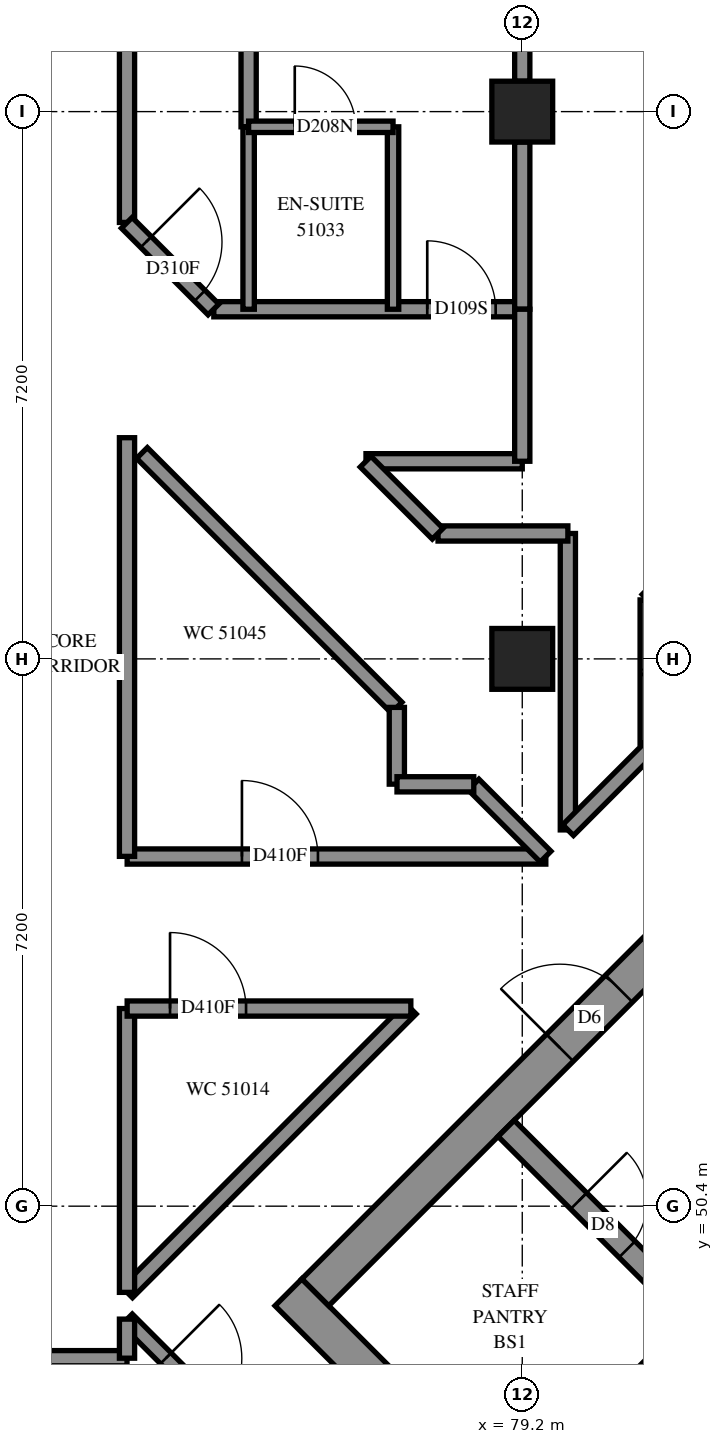
"""IFC4 building model, lengths in metres.
Left out: names, types, materials, properties, quantities, classifications, styles, units other than length and angle.
Written with IfcOpenShell. Run it as: python <this file> out.ifc"""

import sys

from ifc_helpers import new_model, si_unit, direction, frame, frame_2d, origin, origin_2d, place, context, subcontext, project, spatial, rectangle, extrude, element, fill, save


model = new_model("IFC4")
c1 = context("Model", 3, precision=1e-05, world=origin(), true_north=direction((0.0, 1.0)))
c2 = subcontext(c1, "Body", "Model", "MODEL_VIEW")
j1 = project(units=[si_unit("LENGTHUNIT", "METRE"), si_unit("PLANEANGLEUNIT", "RADIAN")], contexts=[c1])
p1 = place(None, origin())
s1 = spatial("IfcSite", under=j1, at=p1, CompositionType="ELEMENT")
p2 = place(p1, origin())
s2 = spatial("IfcBuilding", under=s1, at=p2, CompositionType="ELEMENT")
p3 = place(p2, frame((0.0, 0.0, 189.6)))
s3 = spatial("IfcBuildingStorey", under=s2, at=p3, CompositionType="ELEMENT", Elevation=189.6)
for number, where, z_axis, x_axis in (
    (1, (79.2, 57.6, 0.0), (0.0, 0.0, 1.0), (1.0, 0.0, 0.0)),
    (2, (79.2, 64.8, 0.0), (0.0, 0.0, 1.0), (1.0, 0.0, 0.0)),
):
    element("IfcColumn", number, at=place(p3, frame(where, z_axis=z_axis, x_axis=x_axis)), inside=s3, PredefinedType="COLUMN", context=c2, shape_type="SweptSolid", body=[
        extrude(rectangle(XDim=0.8, YDim=0.8, at=origin_2d()), origin(), (0.0, 0.0, 1.0), 3.1),
    ])
p4 = place(p3, frame((76.124, 49.267, -0.3), z_axis=(0.0, 0.0, 1.0), x_axis=(0.7071067812, -0.7071067812, 0.0)))
e3 = element("IfcWall", 3, at=p4, inside=s3, PredefinedType="SHEAR", context=c2, shape_type="SweptSolid", body=[
    extrude(rectangle(XDim=15.4, YDim=0.5, at=frame_2d((7.7, 0.0))), origin(), (0.0, 0.0, 1.0), 2.7),
])
p5 = place(p3, frame((76.478, 49.267, -0.3), z_axis=(0.0, 0.0, 1.0), x_axis=(0.7071067812, 0.7071067812, 0.0)))
e4 = element("IfcWall", 4, at=p5, inside=s3, PredefinedType="SHEAR", context=c2, shape_type="SweptSolid", body=[
    extrude(rectangle(XDim=14.4, YDim=0.5, at=frame_2d((7.2, 0.0))), origin(), (0.0, 0.0, 1.0), 2.7),
])
p6 = place(p5, frame((4.55, 0.0, 0.3)))
e5 = element("IfcOpeningElement", 5, at=p6, cuts=e4, PredefinedType="OPENING", context=c2, shape_type="SweptSolid", body=[
    extrude(rectangle(XDim=1.1, YDim=2.1, at=frame_2d((0.55, 1.05))), frame((0.0, 0.26, 0.0), z_axis=(0.0, -1.0, 0.0), x_axis=(1.0, 0.0, 0.0)), (0.0, 0.0, 1.0), 0.52),
])
p7 = place(p5, frame((11.35, 0.0, 0.3)))
e6 = element("IfcOpeningElement", 6, at=p7, cuts=e4, PredefinedType="OPENING", context=c2, shape_type="SweptSolid", body=[
    extrude(rectangle(XDim=1.1, YDim=2.1, at=frame_2d((0.55, 1.05))), frame((0.0, 0.26, 0.0), z_axis=(0.0, -1.0, 0.0), x_axis=(1.0, 0.0, 0.0)), (0.0, 0.0, 1.0), 0.52),
])
p8 = place(p3, frame((79.2, 46.544, 0.0), z_axis=(0.0, 0.0, 1.0), x_axis=(0.7071219326, 0.7070916295, 0.0)))
e7 = element("IfcWall", 7, at=p8, inside=s3, PredefinedType="SOLIDWALL", context=c2, shape_type="SweptSolid", body=[
    extrude(rectangle(XDim=3.3, YDim=0.3, at=frame_2d((1.65, 0.0))), origin(), (0.0, 0.0, 1.0), 3.1),
])
p9 = place(p3, frame((78.988, 51.423, 0.0), z_axis=(0.0, 0.0, 1.0), x_axis=(0.7071067812, -0.7071067812, 0.0)))
e8 = element("IfcWall", 8, at=p9, inside=s3, PredefinedType="SOLIDWALL", context=c2, shape_type="SweptSolid", body=[
    extrude(rectangle(XDim=14.4, YDim=0.3, at=frame_2d((7.2, 0.0))), origin(), (0.0, 0.0, 1.0), 3.1),
])
p10 = place(p9, frame((1.35, 0.0, 0.0)))
e9 = element("IfcOpeningElement", 9, at=p10, cuts=e8, PredefinedType="OPENING", context=c2, shape_type="SweptSolid", body=[
    extrude(rectangle(XDim=0.9, YDim=2.1, at=frame_2d((0.45, 1.05))), frame((0.0, 0.16, 0.0), z_axis=(0.0, -1.0, 0.0), x_axis=(1.0, 0.0, 0.0)), (0.0, 0.0, 1.0), 0.32),
])
p11 = place(p9, frame((4.95, 0.0, 0.0)))
e10 = element("IfcOpeningElement", 10, at=p11, cuts=e8, PredefinedType="OPENING", context=c2, shape_type="SweptSolid", body=[
    extrude(rectangle(XDim=0.9, YDim=2.1, at=frame_2d((0.45, 1.05))), frame((0.0, 0.16, 0.0), z_axis=(0.0, -1.0, 0.0), x_axis=(1.0, 0.0, 0.0)), (0.0, 0.0, 1.0), 0.32),
])
p12 = place(p9, frame((8.55, 0.0, 0.0)))
e11 = element("IfcOpeningElement", 11, at=p12, cuts=e8, PredefinedType="OPENING", context=c2, shape_type="SweptSolid", body=[
    extrude(rectangle(XDim=0.9, YDim=2.1, at=frame_2d((0.45, 1.05))), frame((0.0, 0.16, 0.0), z_axis=(0.0, -1.0, 0.0), x_axis=(1.0, 0.0, 0.0)), (0.0, 0.0, 1.0), 0.32),
])
p13 = place(p9, frame((12.05, 0.0, 0.0)))
e12 = element("IfcOpeningElement", 12, at=p13, cuts=e8, PredefinedType="OPENING", context=c2, shape_type="SweptSolid", body=[
    extrude(rectangle(XDim=1.1, YDim=2.1, at=frame_2d((0.55, 1.05))), frame((0.0, 0.16, 0.0), z_axis=(0.0, -1.0, 0.0), x_axis=(1.0, 0.0, 0.0)), (0.0, 0.0, 1.0), 0.32),
])
p14 = place(p3, frame((55.6, 48.4, 0.0), z_axis=(0.0, 0.0, 1.0), x_axis=(1.0, 0.0, 0.0)))
e13 = element("IfcWall", 13, at=p14, inside=s3, PredefinedType="PARTITIONING", context=c2, shape_type="SweptSolid", body=[
    extrude(rectangle(XDim=18.4, YDim=0.2, at=frame_2d((9.2, 0.0))), origin(), (0.0, 0.0, 1.0), 3.1),
])
p15 = place(p14, frame((5.862, 0.0, 0.0)))
e14 = element("IfcOpeningElement", 14, at=p15, cuts=e13, PredefinedType="OPENING", context=c2, shape_type="SweptSolid", body=[
    extrude(rectangle(XDim=1.0, YDim=2.1, at=frame_2d((0.5, 1.05))), frame((0.0, 0.11, 0.0), z_axis=(0.0, -1.0, 0.0), x_axis=(1.0, 0.0, 0.0)), (0.0, 0.0, 1.0), 0.22),
])
p16 = place(p14, frame((11.5, 0.0, 0.0)))
e15 = element("IfcOpeningElement", 15, at=p16, cuts=e13, PredefinedType="OPENING", context=c2, shape_type="SweptSolid", body=[
    extrude(rectangle(XDim=0.9, YDim=2.1, at=frame_2d((0.45, 1.05))), frame((0.0, 0.11, 0.0), z_axis=(0.0, -1.0, 0.0), x_axis=(1.0, 0.0, 0.0)), (0.0, 0.0, 1.0), 0.22),
])
p17 = place(p14, frame((13.2, 0.0, 0.0)))
e16 = element("IfcOpeningElement", 16, at=p17, cuts=e13, PredefinedType="OPENING", context=c2, shape_type="SweptSolid", body=[
    extrude(rectangle(XDim=0.9, YDim=2.1, at=frame_2d((0.45, 1.05))), frame((0.0, 0.11, 0.0), z_axis=(0.0, -1.0, 0.0), x_axis=(1.0, 0.0, 0.0)), (0.0, 0.0, 1.0), 0.22),
])
p18 = place(p3, frame((80.849, 58.377, 0.0), z_axis=(0.0, 0.0, 1.0), x_axis=(0.7071121477, 0.7071014147, 0.0)))
e17 = element("IfcWall", 17, at=p18, inside=s3, PredefinedType="PARTITIONING", context=c2, shape_type="SweptSolid", body=[
    extrude(rectangle(XDim=9.317, YDim=0.2, at=frame_2d((4.659, 0.0))), origin(), (0.0, 0.0, 1.0), 3.1),
])
p19 = place(p3, frame((75.6, 64.6, 0.0), z_axis=(0.0, 0.0, 1.0), x_axis=(0.0, 1.0, 0.0)))
e18 = element("IfcWall", 18, at=p19, inside=s3, PredefinedType="PARTITIONING", context=c2, shape_type="SweptSolid", body=[
    extrude(rectangle(XDim=8.153, YDim=0.2, at=frame_2d((4.076, 0.0))), origin(), (0.0, 0.0, 1.0), 3.1),
])
p20 = place(p3, frame((79.2, 65.2, 0.0), z_axis=(0.0, 0.0, 1.0), x_axis=(0.0, 1.0, 0.0)))
e19 = element("IfcWall", 19, at=p20, inside=s3, PredefinedType="PARTITIONING", context=c2, shape_type="SweptSolid", body=[
    extrude(rectangle(XDim=6.4, YDim=0.2, at=frame_2d((3.2, 0.0))), origin(), (0.0, 0.0, 1.0), 3.1),
])
p21 = place(p3, frame((73.999, 48.911, 0.0), z_axis=(0.0, 0.0, 1.0), x_axis=(0.7071067812, -0.7071067812, 0.0)))
e20 = element("IfcWall", 20, at=p21, inside=s3, PredefinedType="PARTITIONING", context=c2, shape_type="SweptSolid", body=[
    extrude(rectangle(XDim=5.745, YDim=0.2, at=frame_2d((2.872, 0.0))), origin(), (0.0, 0.0, 1.0), 3.1),
])
p22 = place(p21, frame((0.724, 0.0, 0.0)))
e21 = element("IfcOpeningElement", 21, at=p22, cuts=e20, PredefinedType="OPENING", context=c2, shape_type="SweptSolid", body=[
    extrude(rectangle(XDim=1.0, YDim=2.1, at=frame_2d((0.5, 1.05))), frame((0.0, 0.11, 0.0), z_axis=(0.0, -1.0, 0.0), x_axis=(1.0, 0.0, 0.0)), (0.0, 0.0, 1.0), 0.22),
])
p23 = place(p3, frame((74.002, 55.0, 0.0), z_axis=(0.0, 0.0, 1.0), x_axis=(1.0, 0.0, 0.0)))
e22 = element("IfcWall", 22, at=p23, inside=s3, PredefinedType="PARTITIONING", context=c2, shape_type="SweptSolid", body=[
    extrude(rectangle(XDim=5.508, YDim=0.2, at=frame_2d((2.754, 0.0))), origin(), (0.0, 0.0, 1.0), 3.1),
])
p24 = place(p23, frame((1.51, 0.0, 0.0)))
e23 = element("IfcOpeningElement", 23, at=p24, cuts=e22, PredefinedType="OPENING", context=c2, shape_type="SweptSolid", body=[
    extrude(rectangle(XDim=1.0, YDim=2.1, at=frame_2d((0.5, 1.05))), frame((0.0, 0.11, 0.0), z_axis=(0.0, -1.0, 0.0), x_axis=(1.0, 0.0, 0.0)), (0.0, 0.0, 1.0), 0.22),
])
p25 = place(p3, frame((74.0, 55.002, 0.0), z_axis=(0.0, 0.0, 1.0), x_axis=(0.0, 1.0, 0.0)))
e24 = element("IfcWall", 24, at=p25, inside=s3, PredefinedType="PARTITIONING", context=c2, shape_type="SweptSolid", body=[
    extrude(rectangle(XDim=5.508, YDim=0.2, at=frame_2d((2.754, 0.0))), origin(), (0.0, 0.0, 1.0), 3.1),
])
p26 = place(p3, frame((74.001, 49.267, 0.0), z_axis=(0.0, 0.0, 1.0), x_axis=(0.7071067812, 0.7071067812, 0.0)))
e25 = element("IfcWall", 25, at=p26, inside=s3, PredefinedType="PARTITIONING", context=c2, shape_type="SweptSolid", body=[
    extrude(rectangle(XDim=5.278, YDim=0.2, at=frame_2d((2.639, 0.0))), origin(), (0.0, 0.0, 1.0), 3.1),
])
p27 = place(p3, frame((74.197, 60.309, 0.0), z_axis=(0.0, 0.0, 1.0), x_axis=(0.7071067812, -0.7071067812, 0.0)))
e26 = element("IfcWall", 26, at=p27, inside=s3, PredefinedType="PARTITIONING", context=c2, shape_type="SweptSolid", body=[
    extrude(rectangle(XDim=4.738, YDim=0.2, at=frame_2d((2.369, 0.0))), origin(), (0.0, 0.0, 1.0), 3.1),
])
p28 = place(p3, frame((75.142, 62.2, 0.0), z_axis=(0.0, 0.0, 1.0), x_axis=(1.0, 0.0, 0.0)))
e27 = element("IfcWall", 27, at=p28, inside=s3, PredefinedType="PARTITIONING", context=c2, shape_type="SweptSolid", body=[
    extrude(rectangle(XDim=4.058, YDim=0.2, at=frame_2d((2.029, 0.0))), origin(), (0.0, 0.0, 1.0), 3.1),
])
p29 = place(p28, frame((2.808, 0.0, 0.0)))
e28 = element("IfcOpeningElement", 28, at=p29, cuts=e27, PredefinedType="OPENING", context=c2, shape_type="SweptSolid", body=[
    extrude(rectangle(XDim=0.9, YDim=2.1, at=frame_2d((0.45, 1.05))), frame((0.0, 0.11, 0.0), z_axis=(0.0, -1.0, 0.0), x_axis=(1.0, 0.0, 0.0)), (0.0, 0.0, 1.0), 0.22),
])
p30 = place(p3, frame((79.8, 55.35, 0.0), z_axis=(0.0, 0.0, 1.0), x_axis=(0.0, 1.0, 0.0)))
e29 = element("IfcWall", 29, at=p30, inside=s3, PredefinedType="PARTITIONING", context=c2, shape_type="SweptSolid", body=[
    extrude(rectangle(XDim=3.9, YDim=0.2, at=frame_2d((1.95, 0.0))), origin(), (0.0, 0.0, 1.0), 3.1),
])
p31 = place(p3, frame((74.0, 49.266, 0.0), z_axis=(0.0, 0.0, 1.0), x_axis=(0.0, 1.0, 0.0)))
e30 = element("IfcWall", 30, at=p31, inside=s3, PredefinedType="PARTITIONING", context=c2, shape_type="SweptSolid", body=[
    extrude(rectangle(XDim=3.734, YDim=0.2, at=frame_2d((1.867, 0.0))), origin(), (0.0, 0.0, 1.0), 3.1),
])
p32 = place(p3, frame((74.002, 53.0, 0.0), z_axis=(0.0, 0.0, 1.0), x_axis=(1.0, 0.0, 0.0)))
e31 = element("IfcWall", 31, at=p32, inside=s3, PredefinedType="PARTITIONING", context=c2, shape_type="SweptSolid", body=[
    extrude(rectangle(XDim=3.732, YDim=0.2, at=frame_2d((1.866, 0.0))), origin(), (0.0, 0.0, 1.0), 3.1),
])
p33 = place(p32, frame((0.564, 0.0, 0.0)))
e32 = element("IfcOpeningElement", 32, at=p33, cuts=e31, PredefinedType="OPENING", context=c2, shape_type="SweptSolid", body=[
    extrude(rectangle(XDim=1.0, YDim=2.1, at=frame_2d((0.5, 1.05))), frame((0.0, 0.11, 0.0), z_axis=(0.0, -1.0, 0.0), x_axis=(1.0, 0.0, 0.0)), (0.0, 0.0, 1.0), 0.22),
])
p34 = place(p3, frame((74.0, 63.342, 0.0), z_axis=(0.0, 0.0, 1.0), x_axis=(0.0, 1.0, 0.0)))
e33 = element("IfcWall", 33, at=p34, inside=s3, PredefinedType="PARTITIONING", context=c2, shape_type="SweptSolid", body=[
    extrude(rectangle(XDim=3.458, YDim=0.2, at=frame_2d((1.729, 0.0))), origin(), (0.0, 0.0, 1.0), 3.1),
])
for number, where, z_axis, x_axis in (
    (34, (75.6, 62.2, 0.0), (0.0, 0.0, 1.0), (0.0, 1.0, 0.0)),
    (35, (77.5, 62.2, 0.0), (0.0, 0.0, 1.0), (0.0, 1.0, 0.0)),
):
    element("IfcWall", number, at=place(p3, frame(where, z_axis=z_axis, x_axis=x_axis)), inside=s3, PredefinedType="PARTITIONING", context=c2, shape_type="SweptSolid", body=[
        extrude(rectangle(XDim=2.4, YDim=0.15, at=frame_2d((1.2, 0.0))), origin(), (0.0, 0.0, 1.0), 3.1),
    ])
p35 = place(p3, frame((79.2, 62.2, 0.0), z_axis=(0.0, 0.0, 1.0), x_axis=(0.0, 1.0, 0.0)))
e36 = element("IfcWall", 36, at=p35, inside=s3, PredefinedType="PARTITIONING", context=c2, shape_type="SweptSolid", body=[
    extrude(rectangle(XDim=2.2, YDim=0.2, at=frame_2d((1.1, 0.0))), origin(), (0.0, 0.0, 1.0), 3.1),
])
p36 = place(p3, frame((77.144, 60.2, 0.0), z_axis=(0.0, 0.0, 1.0), x_axis=(1.0, 0.0, 0.0)))
e37 = element("IfcWall", 37, at=p36, inside=s3, PredefinedType="PARTITIONING", context=c2, shape_type="SweptSolid", body=[
    extrude(rectangle(XDim=2.056, YDim=0.2, at=frame_2d((1.028, 0.0))), origin(), (0.0, 0.0, 1.0), 3.1),
])
p37 = place(p3, frame((79.2, 60.2, 0.0), z_axis=(0.0, 0.0, 1.0), x_axis=(0.0, 1.0, 0.0)))
e38 = element("IfcWall", 38, at=p37, inside=s3, PredefinedType="PARTITIONING", context=c2, shape_type="SweptSolid", body=[
    extrude(rectangle(XDim=2.0, YDim=0.2, at=frame_2d((1.0, 0.0))), origin(), (0.0, 0.0, 1.0), 3.1),
])
p38 = place(p3, frame((75.6, 64.6, 0.0), z_axis=(0.0, 0.0, 1.0), x_axis=(1.0, 0.0, 0.0)))
e39 = element("IfcWall", 39, at=p38, inside=s3, PredefinedType="PARTITIONING", context=c2, shape_type="SweptSolid", body=[
    extrude(rectangle(XDim=1.9, YDim=0.15, at=frame_2d((0.95, 0.0))), origin(), (0.0, 0.0, 1.0), 3.1),
])
p39 = place(p38, frame((0.607, 0.0, 0.0)))
e40 = element("IfcOpeningElement", 40, at=p39, cuts=e39, PredefinedType="OPENING", context=c2, shape_type="SweptSolid", body=[
    extrude(rectangle(XDim=0.8, YDim=2.1, at=frame_2d((0.4, 1.05))), frame((0.0, 0.085, 0.0), z_axis=(0.0, -1.0, 0.0), x_axis=(1.0, 0.0, 0.0)), (0.0, 0.0, 1.0), 0.17),
])
p40 = place(p3, frame((80.85, 56.49, 0.0), z_axis=(0.0, 0.0, 1.0), x_axis=(0.0, 1.0, 0.0)))
e41 = element("IfcWall", 41, at=p40, inside=s3, PredefinedType="PARTITIONING", context=c2, shape_type="SweptSolid", body=[
    extrude(rectangle(XDim=1.886, YDim=0.2, at=frame_2d((0.943, 0.0))), origin(), (0.0, 0.0, 1.0), 3.1),
])
p41 = place(p3, frame((78.092, 59.25, 0.0), z_axis=(0.0, 0.0, 1.0), x_axis=(1.0, 0.0, 0.0)))
e42 = element("IfcWall", 42, at=p41, inside=s3, PredefinedType="PARTITIONING", context=c2, shape_type="SweptSolid", body=[
    extrude(rectangle(XDim=1.708, YDim=0.2, at=frame_2d((0.854, 0.0))), origin(), (0.0, 0.0, 1.0), 3.1),
])
p42 = place(p3, frame((73.997, 63.337, 0.0), z_axis=(0.0, 0.0, 1.0), x_axis=(0.7071067812, -0.7071067812, 0.0)))
e43 = element("IfcWall", 43, at=p42, inside=s3, PredefinedType="PARTITIONING", context=c2, shape_type="SweptSolid", body=[
    extrude(rectangle(XDim=1.612, YDim=0.2, at=frame_2d((0.806, 0.0))), origin(), (0.0, 0.0, 1.0), 3.1),
])
p43 = place(p42, frame((0.357, 0.0, 0.0)))
e44 = element("IfcOpeningElement", 44, at=p43, cuts=e43, PredefinedType="OPENING", context=c2, shape_type="SweptSolid", body=[
    extrude(rectangle(XDim=1.0, YDim=2.1, at=frame_2d((0.5, 1.05))), frame((0.0, 0.11, 0.0), z_axis=(0.0, -1.0, 0.0), x_axis=(1.0, 0.0, 0.0)), (0.0, 0.0, 1.0), 0.22),
])
p44 = place(p3, frame((79.803, 55.347, 0.0), z_axis=(0.0, 0.0, 1.0), x_axis=(0.706460727, 0.7077522457, 0.0)))
e45 = element("IfcWall", 45, at=p44, inside=s3, PredefinedType="PARTITIONING", context=c2, shape_type="SweptSolid", body=[
    extrude(rectangle(XDim=1.549, YDim=0.2, at=frame_2d((0.774, 0.0))), origin(), (0.0, 0.0, 1.0), 3.1),
])
for number, where, z_axis, x_axis in (
    (46, (78.559, 55.947, 0.0), (0.0, 0.0, 1.0), (0.707, -0.707, 0.0)),
    (47, (77.139, 60.195, 0.0), (0.0, 0.0, 1.0), (0.707, -0.707, 0.0)),
):
    element("IfcWall", number, at=place(p3, frame(where, z_axis=z_axis, x_axis=x_axis)), inside=s3, PredefinedType="PARTITIONING", context=c2, shape_type="SweptSolid", body=[
        extrude(rectangle(XDim=1.341, YDim=0.2, at=frame_2d((0.67, 0.0))), origin(), (0.0, 0.0, 1.0), 3.1),
    ])
for number, where, z_axis, x_axis in (
    (48, (77.55, 55.952, 0.0), (0.0, 0.0, 1.0), (0.0, 1.0, 0.0)),
    (49, (77.552, 55.95, 0.0), (0.0, 0.0, 1.0), (1.0, 0.0, 0.0)),
):
    element("IfcWall", number, at=place(p3, frame(where, z_axis=z_axis, x_axis=x_axis)), inside=s3, PredefinedType="PARTITIONING", context=c2, shape_type="SweptSolid", body=[
        extrude(rectangle(XDim=1.01, YDim=0.2, at=frame_2d((0.505, 0.0))), origin(), (0.0, 0.0, 1.0), 3.1),
    ])
p45 = place(p3, frame((74.0, 48.4, 0.0), z_axis=(0.0, 0.0, 1.0), x_axis=(0.0, 1.0, 0.0)))
e50 = element("IfcWall", 50, at=p45, inside=s3, PredefinedType="PARTITIONING", context=c2, shape_type="SweptSolid", body=[
    extrude(rectangle(XDim=0.514, YDim=0.2, at=frame_2d((0.257, 0.0))), origin(), (0.0, 0.0, 1.0), 3.1),
])
p46 = place(p6, origin())
e51 = element("IfcDoor", 51, at=p46, inside=s3, OperationType="DOUBLE_DOOR_SINGLE_SWING", PredefinedType="DOOR", context=c2, shape_type="SweptSolid", body=[
    extrude(rectangle(XDim=1.1, YDim=2.1, at=frame_2d((0.55, 1.05))), frame((0.0, 0.025, 0.0), z_axis=(0.0, -1.0, 0.0), x_axis=(1.0, 0.0, 0.0)), (0.0, 0.0, 1.0), 0.05),
])
fill(e5, e51)
p47 = place(p10, origin())
e52 = element("IfcDoor", 52, at=p47, inside=s3, OperationType="SINGLE_SWING_LEFT", PredefinedType="DOOR", context=c2, shape_type="SweptSolid", body=[
    extrude(rectangle(XDim=0.9, YDim=2.1, at=frame_2d((0.45, 1.05))), frame((0.0, 0.025, 0.0), z_axis=(0.0, -1.0, 0.0), x_axis=(1.0, 0.0, 0.0)), (0.0, 0.0, 1.0), 0.05),
])
fill(e9, e52)
p48 = place(p33, origin())
e53 = element("IfcDoor", 53, at=p48, inside=s3, OperationType="SINGLE_SWING_RIGHT", PredefinedType="DOOR", context=c2, shape_type="SweptSolid", body=[
    extrude(rectangle(XDim=1.0, YDim=2.1, at=frame_2d((0.5, 1.05))), frame((0.0, 0.025, 0.0), z_axis=(0.0, -1.0, 0.0), x_axis=(1.0, 0.0, 0.0)), (0.0, 0.0, 1.0), 0.05),
])
fill(e32, e53)
p49 = place(p43, origin())
e54 = element("IfcDoor", 54, at=p49, inside=s3, OperationType="SINGLE_SWING_RIGHT", PredefinedType="DOOR", context=c2, shape_type="SweptSolid", body=[
    extrude(rectangle(XDim=1.0, YDim=2.1, at=frame_2d((0.5, 1.05))), frame((0.0, 0.025, 0.0), z_axis=(0.0, -1.0, 0.0), x_axis=(1.0, 0.0, 0.0)), (0.0, 0.0, 1.0), 0.05),
])
fill(e44, e54)
p50 = place(p29, origin())
e55 = element("IfcDoor", 55, at=p50, inside=s3, OperationType="SINGLE_SWING_LEFT", PredefinedType="DOOR", context=c2, shape_type="SweptSolid", body=[
    extrude(rectangle(XDim=0.9, YDim=2.1, at=frame_2d((0.45, 1.05))), frame((0.0, 0.025, 0.0), z_axis=(0.0, -1.0, 0.0), x_axis=(1.0, 0.0, 0.0)), (0.0, 0.0, 1.0), 0.05),
])
fill(e28, e55)
p51 = place(p39, origin())
e56 = element("IfcDoor", 56, at=p51, inside=s3, OperationType="SINGLE_SWING_RIGHT", PredefinedType="DOOR", context=c2, shape_type="SweptSolid", body=[
    extrude(rectangle(XDim=0.8, YDim=2.1, at=frame_2d((0.4, 1.05))), frame((0.0, 0.025, 0.0), z_axis=(0.0, -1.0, 0.0), x_axis=(1.0, 0.0, 0.0)), (0.0, 0.0, 1.0), 0.05),
])
fill(e40, e56)
p52 = place(p22, origin())
e57 = element("IfcDoor", 57, at=p52, inside=s3, OperationType="SINGLE_SWING_LEFT", PredefinedType="DOOR", context=c2, shape_type="SweptSolid", body=[
    extrude(rectangle(XDim=1.0, YDim=2.1, at=frame_2d((0.5, 1.05))), frame((0.0, 0.025, 0.0), z_axis=(0.0, -1.0, 0.0), x_axis=(1.0, 0.0, 0.0)), (0.0, 0.0, 1.0), 0.05),
])
fill(e21, e57)
p53 = place(p24, origin())
e58 = element("IfcDoor", 58, at=p53, inside=s3, OperationType="SINGLE_SWING_LEFT", PredefinedType="DOOR", context=c2, shape_type="SweptSolid", body=[
    extrude(rectangle(XDim=1.0, YDim=2.1, at=frame_2d((0.5, 1.05))), frame((0.0, 0.025, 0.0), z_axis=(0.0, -1.0, 0.0), x_axis=(1.0, 0.0, 0.0)), (0.0, 0.0, 1.0), 0.05),
])
fill(e23, e58)
save(model, sys.argv[1])
